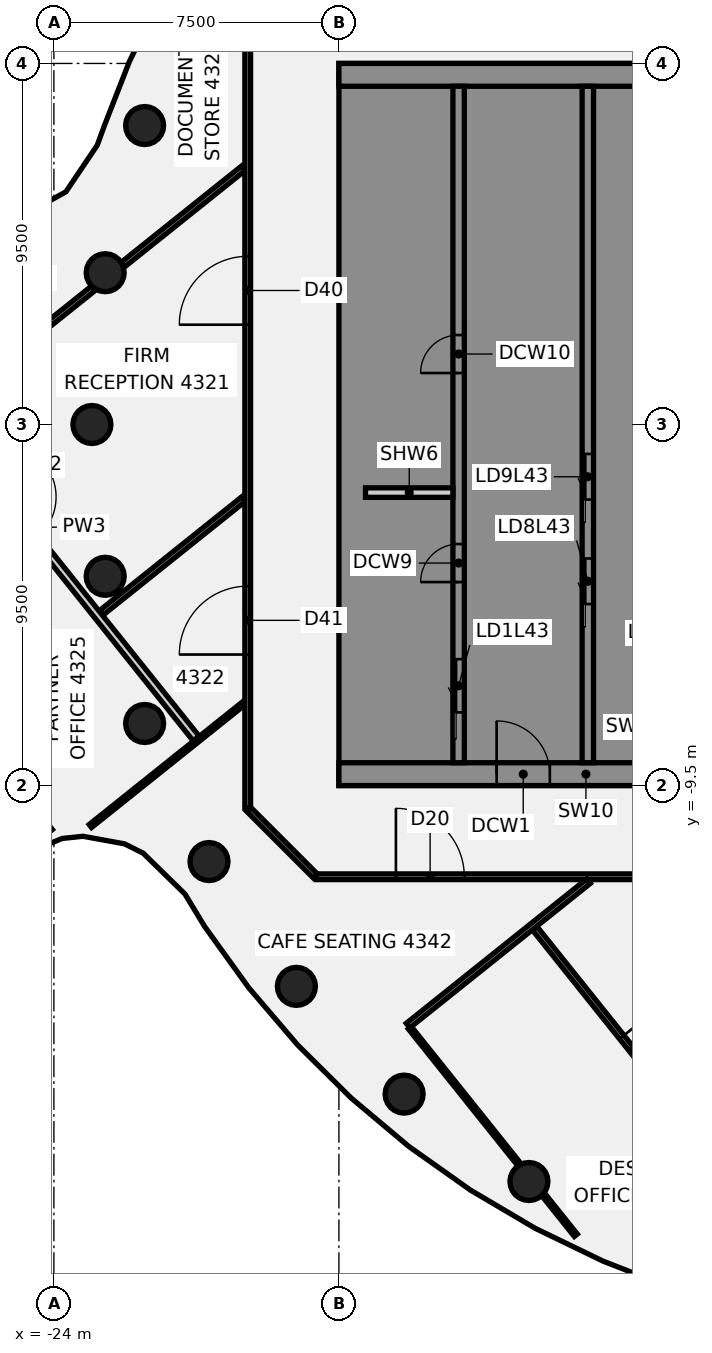
"""IFC4 building model, lengths in metres.
Left out: names, types, materials, properties, quantities, classifications, styles, units other than length and angle.
Written with IfcOpenShell. Run it as: python <this file> out.ifc"""

import sys

from ifc_helpers import new_model, si_unit, direction, frame, frame_2d, origin, origin_2d, place, context, subcontext, project, spatial, polyline, rectangle, circle, outline, extrude, element, fill, save


model = new_model("IFC4")
c1 = context("Model", 3, precision=1e-05, world=origin(), true_north=direction((0.0, 1.0)))
c2 = subcontext(c1, "Body", "Model", "MODEL_VIEW")
j1 = project(units=[si_unit("LENGTHUNIT", "METRE"), si_unit("PLANEANGLEUNIT", "RADIAN")], contexts=[c1])
p1 = place(None, origin())
s1 = spatial("IfcSite", under=j1, at=p1, CompositionType="ELEMENT")
p2 = place(p1, origin())
s2 = spatial("IfcBuilding", under=s1, at=p2, CompositionType="ELEMENT")
p3 = place(p2, frame((0.0, 0.0, 174.25)))
s3 = spatial("IfcBuildingStorey", under=s2, at=p3, CompositionType="ELEMENT", Elevation=174.25)
for number, where, z_axis, x_axis in (
    (1, (-21.613, 7.866, -0.14), (0.0, 0.0, 1.0), (1.0, 0.0, 0.0)),
    (2, (-22.651, 3.994, -0.14), (0.0, 0.0, 1.0), (1.0, 0.0, 0.0)),
    (3, (-23.0, 0.0, -0.14), (0.0, 0.0, 1.0), (1.0, 0.0, 0.0)),
    (4, (-22.651, -3.994, -0.14), (0.0, 0.0, 1.0), (1.0, 0.0, 0.0)),
    (5, (-21.613, -7.866, -0.14), (0.0, 0.0, 1.0), (1.0, 0.0, 0.0)),
    (6, (-19.919, -11.5, -0.14), (0.0, 0.0, 1.0), (1.0, 0.0, 0.0)),
    (7, (-17.619, -14.784, -0.14), (0.0, 0.0, 1.0), (1.0, 0.0, 0.0)),
    (8, (-14.784, -17.619, -0.14), (0.0, 0.0, 1.0), (1.0, 0.0, 0.0)),
    (9, (-11.5, -19.919, -0.14), (0.0, 0.0, 1.0), (1.0, 0.0, 0.0)),
):
    element("IfcColumn", number, at=place(p3, frame(where, z_axis=z_axis, x_axis=x_axis)), inside=s3, PredefinedType="COLUMN", context=c2, shape_type="SweptSolid", body=[
        extrude(circle(Radius=0.5, at=origin_2d()), origin(), (0.0, 0.0, 1.0), 3.71),
    ])
p4 = place(p3, frame((-29.152, 2.857, 0.0), z_axis=(0.0, 0.0, 1.0), x_axis=(0.624692956649, -0.780870482163, 0.0)))
e10 = element("IfcWall", 10, at=p4, inside=s3, PredefinedType="PARTITIONING", context=c2, shape_type="SweptSolid", body=[
    extrude(rectangle(XDim=14.24, YDim=0.2, at=frame_2d((7.12, 0.0))), origin(), (0.0, 0.0, 1.0), 2.87),
])
p5 = place(p4, frame((6.099, 0.0, 0.0)))
e11 = element("IfcOpeningElement", 11, at=p5, cuts=e10, PredefinedType="OPENING", context=c2, shape_type="SweptSolid", body=[
    extrude(rectangle(XDim=1.4, YDim=2.1, at=frame_2d((0.7, 1.05))), frame((0.0, 0.11, 0.0), z_axis=(0.0, -1.0, 0.0), x_axis=(1.0, 0.0, 0.0)), (0.0, 0.0, 1.0), 0.22),
])
p6 = place(p3, frame((-24.625, -10.006, 0.0), z_axis=(0.0, 0.0, 1.0), x_axis=(0.624661023659, -0.780896027344, 0.0)))
e12 = element("IfcWall", 12, at=p6, inside=s3, PredefinedType="PARTITIONING", context=c2, shape_type="SweptSolid", body=[
    extrude(rectangle(XDim=0.875, YDim=0.1, at=frame_2d((0.438, 0.0))), origin(), (0.0, 0.0, 1.0), 2.97),
])
p7 = place(p3, frame((-14.633, -15.874, 0.0), z_axis=(0.0, 0.0, 1.0), x_axis=(0.624636960835, -0.780915275276, 0.0)))
e13 = element("IfcWall", 13, at=p7, inside=s3, PredefinedType="PARTITIONING", context=c2, shape_type="SweptSolid", body=[
    extrude(rectangle(XDim=4.613, YDim=0.1, at=frame_2d((2.307, 0.0))), origin(), (0.0, 0.0, 1.0), 2.97),
])
p8 = place(p3, frame((-11.134, -20.249, 0.0), z_axis=(0.0, 0.0, 1.0), x_axis=(0.62463072699, -0.780920261551, 0.0)))
e14 = element("IfcWall", 14, at=p8, inside=s3, PredefinedType="PARTITIONING", context=c2, shape_type="SweptSolid", body=[
    extrude(rectangle(XDim=1.389, YDim=0.1, at=frame_2d((0.694, 0.0))), origin(), (0.0, 0.0, 1.0), 2.97),
])
p9 = place(p3, frame((-11.35, -13.253, 0.0), z_axis=(0.0, 0.0, 1.0), x_axis=(0.624656044028, -0.780900010667, 0.0)))
e15 = element("IfcWall", 15, at=p9, inside=s3, PredefinedType="PARTITIONING", context=c2, shape_type="SweptSolid", body=[
    extrude(rectangle(XDim=11.45, YDim=0.15, at=frame_2d((5.725, 0.0))), origin(), (0.0, 0.0, 1.0), 2.97),
])
p10 = place(p9, frame((3.67, 0.0, 0.0)))
e16 = element("IfcOpeningElement", 16, at=p10, cuts=e15, PredefinedType="OPENING", context=c2, shape_type="SweptSolid", body=[
    extrude(rectangle(XDim=0.9, YDim=2.1, at=frame_2d((0.45, 1.05))), frame((0.0, 0.085, 0.0), z_axis=(0.0, -1.0, 0.0), x_axis=(1.0, 0.0, 0.0)), (0.0, 0.0, 1.0), 0.17),
])
p11 = place(p3, frame((-18.872, -10.128, 0.0), z_axis=(0.0, 0.0, 1.0), x_axis=(0.707106781187, -0.707106781187, 0.0)))
e17 = element("IfcWall", 17, at=p11, inside=s3, PredefinedType="PARTITIONING", context=c2, shape_type="SweptSolid", body=[
    extrude(rectangle(XDim=2.465, YDim=0.15, at=frame_2d((1.232, 0.0))), origin(), (0.0, 0.0, 1.0), 2.97),
])
p12 = place(p3, frame((-17.1, -11.9, 0.0), z_axis=(0.0, 0.0, 1.0), x_axis=(1.0, 0.0, 0.0)))
e18 = element("IfcWall", 18, at=p12, inside=s3, PredefinedType="PARTITIONING", context=c2, shape_type="SweptSolid", body=[
    extrude(rectangle(XDim=34.165, YDim=0.15, at=frame_2d((17.083, 0.0))), origin(), (0.0, 0.0, 1.0), 2.97),
])
p13 = place(p12, frame((9.414, 0.0, 0.0)))
e19 = element("IfcOpeningElement", 19, at=p13, cuts=e18, PredefinedType="OPENING", context=c2, shape_type="SweptSolid", body=[
    extrude(rectangle(XDim=1.8, YDim=2.1, at=frame_2d((0.9, 1.05))), frame((0.0, 0.085, 0.0), z_axis=(0.0, -1.0, 0.0), x_axis=(1.0, 0.0, 0.0)), (0.0, 0.0, 1.0), 0.17),
])
p14 = place(p12, frame((2.1, 0.0, 0.0)))
e20 = element("IfcOpeningElement", 20, at=p14, cuts=e18, PredefinedType="OPENING", context=c2, shape_type="SweptSolid", body=[
    extrude(rectangle(XDim=1.8, YDim=2.1, at=frame_2d((0.9, 1.05))), frame((0.0, 0.085, 0.0), z_axis=(0.0, -1.0, 0.0), x_axis=(1.0, 0.0, 0.0)), (0.0, 0.0, 1.0), 0.17),
])
p15 = place(p12, frame((23.853, 0.0, 0.0)))
e21 = element("IfcOpeningElement", 21, at=p15, cuts=e18, PredefinedType="OPENING", context=c2, shape_type="SweptSolid", body=[
    extrude(rectangle(XDim=1.8, YDim=2.1, at=frame_2d((0.9, 1.05))), frame((0.0, 0.085, 0.0), z_axis=(0.0, -1.0, 0.0), x_axis=(1.0, 0.0, 0.0)), (0.0, 0.0, 1.0), 0.17),
])
p16 = place(p3, frame((-27.013, 0.344, 0.0), z_axis=(0.0, 0.0, 1.0), x_axis=(0.780855081302, 0.624712207344, 0.0)))
e22 = element("IfcWall", 22, at=p16, inside=s3, PredefinedType="PARTITIONING", context=c2, shape_type="SweptSolid", body=[
    extrude(rectangle(XDim=5.205, YDim=0.15, at=frame_2d((2.603, 0.0))), origin(), (0.0, 0.0, 1.0), 2.97),
])
p17 = place(p16, frame((2.75, 0.0, 0.0)))
e23 = element("IfcOpeningElement", 23, at=p17, cuts=e22, PredefinedType="OPENING", context=c2, shape_type="SweptSolid", body=[
    extrude(rectangle(XDim=0.9, YDim=2.1, at=frame_2d((0.45, 1.05))), frame((0.0, 0.085, 0.0), z_axis=(0.0, -1.0, 0.0), x_axis=(1.0, 0.0, 0.0)), (0.0, 0.0, 1.0), 0.17),
])
p18 = place(p3, frame((-22.195, 4.198, 0.0), z_axis=(0.0, 0.0, 1.0), x_axis=(0.780862978875, 0.624702335694, 0.0)))
e24 = element("IfcWall", 24, at=p18, inside=s3, PredefinedType="PARTITIONING", context=c2, shape_type="SweptSolid", body=[
    extrude(rectangle(XDim=4.085, YDim=0.15, at=frame_2d((2.042, 0.0))), origin(), (0.0, 0.0, 1.0), 2.97),
])
p19 = place(p3, frame((-23.041, -10.565, 0.0), z_axis=(0.0, 0.0, 1.0), x_axis=(0.780900948361, 0.624654871789, 0.0)))
e25 = element("IfcWall", 25, at=p19, inside=s3, PredefinedType="PARTITIONING", context=c2, shape_type="SweptSolid", body=[
    extrude(rectangle(XDim=5.188, YDim=0.1, at=frame_2d((2.594, 0.0))), origin(), (0.0, 0.0, 1.0), 2.97),
])
p20 = place(p3, frame((-22.75, -4.954, 0.0), z_axis=(0.0, 0.0, 1.0), x_axis=(0.780873776027, 0.624688839274, 0.0)))
e26 = element("IfcWall", 26, at=p20, inside=s3, PredefinedType="PARTITIONING", context=c2, shape_type="SweptSolid", body=[
    extrude(rectangle(XDim=4.796, YDim=0.15, at=frame_2d((2.398, 0.0))), origin(), (0.0, 0.0, 1.0), 2.87),
])
p21 = place(p3, frame((-14.68, -15.815, 0.0), z_axis=(0.0, 0.0, 1.0), x_axis=(0.780857060807, 0.624709733066, 0.0)))
e27 = element("IfcWall", 27, at=p21, inside=s3, PredefinedType="PARTITIONING", context=c2, shape_type="SweptSolid", body=[
    extrude(rectangle(XDim=6.082, YDim=0.15, at=frame_2d((3.041, 0.0))), origin(), (0.0, 0.0, 1.0), 2.97),
])
p22 = place(p3, frame((-18.9, -10.1, 0.0), z_axis=(0.0, 0.0, 1.0), x_axis=(0.0, 1.0, 0.0)))
e28 = element("IfcWall", 28, at=p22, inside=s3, PredefinedType="PARTITIONING", context=c2, shape_type="SweptSolid", body=[
    extrude(rectangle(XDim=20.2, YDim=0.15, at=frame_2d((10.1, 0.0))), origin(), (0.0, 0.0, 1.0), 2.97),
])
p23 = place(p22, frame((12.726, 0.0, 0.0)))
e29 = element("IfcOpeningElement", 29, at=p23, cuts=e28, PredefinedType="OPENING", context=c2, shape_type="SweptSolid", body=[
    extrude(rectangle(XDim=1.8, YDim=2.1, at=frame_2d((0.9, 1.05))), frame((0.0, 0.085, 0.0), z_axis=(0.0, -1.0, 0.0), x_axis=(1.0, 0.0, 0.0)), (0.0, 0.0, 1.0), 0.17),
])
p24 = place(p22, frame((4.047, 0.0, 0.0)))
e30 = element("IfcOpeningElement", 30, at=p24, cuts=e28, PredefinedType="OPENING", context=c2, shape_type="SweptSolid", body=[
    extrude(rectangle(XDim=1.8, YDim=2.1, at=frame_2d((0.9, 1.05))), frame((0.0, 0.085, 0.0), z_axis=(0.0, -1.0, 0.0), x_axis=(1.0, 0.0, 0.0)), (0.0, 0.0, 1.0), 0.17),
])
p25 = place(p3, frame((-16.5, -9.2, 0.0), z_axis=(0.0, 0.0, 1.0), x_axis=(1.0, 0.0, 0.0)))
e31 = element("IfcWall", 31, at=p25, inside=s3, PredefinedType="SHEAR", context=c2, shape_type="SweptSolid", body=[
    extrude(rectangle(XDim=13.0, YDim=0.6, at=frame_2d((6.5, 0.0))), origin(), (0.0, 0.0, 1.0), 3.57),
])
p26 = place(p25, frame((4.15, 0.0, 0.0)))
e32 = element("IfcOpeningElement", 32, at=p26, cuts=e31, PredefinedType="OPENING", context=c2, shape_type="SweptSolid", body=[
    extrude(rectangle(XDim=1.4, YDim=2.1, at=frame_2d((0.7, 1.05))), frame((0.0, 0.31, 0.0), z_axis=(0.0, -1.0, 0.0), x_axis=(1.0, 0.0, 0.0)), (0.0, 0.0, 1.0), 0.62),
])
p27 = place(p25, frame((10.125, 0.0, 0.0)))
e33 = element("IfcOpeningElement", 33, at=p27, cuts=e31, PredefinedType="OPENING", context=c2, shape_type="SweptSolid", body=[
    extrude(rectangle(XDim=1.4, YDim=2.1, at=frame_2d((0.7, 1.05))), frame((0.0, 0.31, 0.0), z_axis=(0.0, -1.0, 0.0), x_axis=(1.0, 0.0, 0.0)), (0.0, 0.0, 1.0), 0.62),
])
p28 = place(p3, origin())
e34 = element("IfcWall", 34, at=p28, inside=s3, PredefinedType="SHEAR", context=c2, shape_type="SweptSolid", body=[
    extrude(outline(polyline([(-13.5, -8.125), (-15.9, -8.125), (-15.9, -5.625), (-13.5, -5.625), (-13.5, -5.375), (-15.9, -5.375), (-15.9, 5.375), (-13.5, 5.375), (-13.5, 5.625), (-15.9, 5.625), (-15.9, 8.125), (-13.5, 8.125), (-13.5, 8.9), (-15.9, 8.9), (-16.5, 8.9), (-16.5, -8.9), (-15.9, -8.9), (-13.5, -8.9), (-13.5, -8.125)])), origin(), (0.0, 0.0, 1.0), 3.57),
])
p29 = place(p3, frame((-16.5, 9.2, 0.0), z_axis=(0.0, 0.0, 1.0), x_axis=(1.0, 0.0, 0.0)))
e35 = element("IfcWall", 35, at=p29, inside=s3, PredefinedType="SHEAR", context=c2, shape_type="SweptSolid", body=[
    extrude(rectangle(XDim=13.0, YDim=0.6, at=frame_2d((6.5, 0.0))), origin(), (0.0, 0.0, 1.0), 3.57),
])
p30 = place(p3, origin())
e36 = element("IfcWall", 36, at=p30, inside=s3, PredefinedType="SHEAR", context=c2, shape_type="SweptSolid", body=[
    extrude(outline(polyline([(-9.8, -5.375), (-9.8, -5.625), (-7.5, -5.625), (-7.2, -5.625), (-7.2, 8.9), (-7.5, 8.9), (-9.8, 8.9), (-9.8, 8.125), (-7.5, 8.125), (-7.5, 5.625), (-9.8, 5.625), (-9.8, 5.375), (-7.5, 5.375), (-7.5, 2.875), (-9.8, 2.875), (-9.8, 2.625), (-7.5, 2.625), (-7.5, 0.125), (-9.8, 0.125), (-9.8, -0.125), (-7.5, -0.125), (-7.5, -2.625), (-9.8, -2.625), (-9.8, -2.875), (-7.5, -2.875), (-7.5, -5.375), (-9.8, -5.375)])), origin(), (0.0, 0.0, 1.0), 3.57),
])
p31 = place(p3, origin())
e37 = element("IfcWall", 37, at=p31, inside=s3, PredefinedType="SHEAR", context=c2, shape_type="SweptSolid", body=[
    extrude(outline(polyline([(-7.5, -8.125), (-9.55, -8.125), (-9.55, -5.625), (-9.8, -5.625), (-9.8, -8.125), (-9.8, -8.9), (-7.5, -8.9), (-7.5, -8.125)])), origin(), (0.0, 0.0, 1.0), 3.57),
])
p32 = place(p3, frame((-13.35, -8.9, 0.0), z_axis=(0.0, 0.0, 1.0), x_axis=(0.0, 1.0, 0.0)))
e38 = element("IfcWall", 38, at=p32, inside=s3, PredefinedType="SHEAR", context=c2, shape_type="SweptSolid", body=[
    extrude(rectangle(XDim=17.8, YDim=0.3, at=frame_2d((8.9, 0.0))), origin(), (0.0, 0.0, 1.0), 3.57),
])
p33 = place(p32, frame((1.325, 0.0, 0.0)))
e39 = element("IfcOpeningElement", 39, at=p33, cuts=e38, PredefinedType="OPENING", context=c2, shape_type="SweptSolid", body=[
    extrude(rectangle(XDim=1.4, YDim=2.1, at=frame_2d((0.7, 1.05))), frame((0.0, 0.16, 0.0), z_axis=(0.0, -1.0, 0.0), x_axis=(1.0, 0.0, 0.0)), (0.0, 0.0, 1.0), 0.32),
])
p34 = place(p32, frame((4.754, 0.0, 0.0)))
e40 = element("IfcOpeningElement", 40, at=p34, cuts=e38, PredefinedType="OPENING", context=c2, shape_type="SweptSolid", body=[
    extrude(rectangle(XDim=1.0, YDim=2.1, at=frame_2d((0.5, 1.05))), frame((0.0, 0.16, 0.0), z_axis=(0.0, -1.0, 0.0), x_axis=(1.0, 0.0, 0.0)), (0.0, 0.0, 1.0), 0.32),
])
p35 = place(p32, frame((10.254, 0.0, 0.0)))
e41 = element("IfcOpeningElement", 41, at=p35, cuts=e38, PredefinedType="OPENING", context=c2, shape_type="SweptSolid", body=[
    extrude(rectangle(XDim=1.0, YDim=2.1, at=frame_2d((0.5, 1.05))), frame((0.0, 0.16, 0.0), z_axis=(0.0, -1.0, 0.0), x_axis=(1.0, 0.0, 0.0)), (0.0, 0.0, 1.0), 0.32),
])
p36 = place(p3, frame((-9.95, -8.9, 0.0), z_axis=(0.0, 0.0, 1.0), x_axis=(0.0, 1.0, 0.0)))
e42 = element("IfcWall", 42, at=p36, inside=s3, PredefinedType="SHEAR", context=c2, shape_type="SweptSolid", body=[
    extrude(rectangle(XDim=17.8, YDim=0.3, at=frame_2d((8.9, 0.0))), origin(), (0.0, 0.0, 1.0), 3.57),
])
p37 = place(p36, frame((4.175, 0.0, 0.0)))
e43 = element("IfcOpeningElement", 43, at=p37, cuts=e42, PredefinedType="OPENING", context=c2, shape_type="SweptSolid", body=[
    extrude(rectangle(XDim=1.2, YDim=2.1, at=frame_2d((0.6, 1.05))), frame((0.0, 0.16, 0.0), z_axis=(0.0, -1.0, 0.0), x_axis=(1.0, 0.0, 0.0)), (0.0, 0.0, 1.0), 0.32),
])
p38 = place(p36, frame((6.925, 0.0, 0.0)))
e44 = element("IfcOpeningElement", 44, at=p38, cuts=e42, PredefinedType="OPENING", context=c2, shape_type="SweptSolid", body=[
    extrude(rectangle(XDim=1.2, YDim=2.1, at=frame_2d((0.6, 1.05))), frame((0.0, 0.16, 0.0), z_axis=(0.0, -1.0, 0.0), x_axis=(1.0, 0.0, 0.0)), (0.0, 0.0, 1.0), 0.32),
])
p39 = place(p3, frame((-15.8, -1.792, 0.0), z_axis=(0.0, 0.0, 1.0), x_axis=(1.0, 0.0, 0.0)))
e45 = element("IfcWall", 45, at=p39, inside=s3, PredefinedType="PARTITIONING", context=c2, shape_type="SweptSolid", body=[
    extrude(rectangle(XDim=2.3, YDim=0.25, at=frame_2d((1.15, 0.0))), origin(), (0.0, 0.0, 1.0), 3.57),
])
p40 = place(p10, frame((0.9, 0.0, 0.0), z_axis=(0.0, 0.0, 1.0), x_axis=(-1.0, 0.0, 0.0)))
e46 = element("IfcDoor", 46, at=p40, inside=s3, OperationType="SINGLE_SWING_LEFT", PredefinedType="DOOR", context=c2, shape_type="SweptSolid", body=[
    extrude(rectangle(XDim=0.9, YDim=2.1, at=frame_2d((0.45, 1.05))), frame((0.0, 0.025, 0.0), z_axis=(0.0, -1.0, 0.0), x_axis=(1.0, 0.0, 0.0)), (0.0, 0.0, 1.0), 0.05),
])
fill(e16, e46)
p41 = place(p14, frame((1.8, 0.0, 0.0), z_axis=(0.0, 0.0, 1.0), x_axis=(-1.0, 0.0, 0.0)))
e47 = element("IfcDoor", 47, at=p41, inside=s3, OperationType="DOUBLE_DOOR_SINGLE_SWING", PredefinedType="DOOR", context=c2, shape_type="SweptSolid", body=[
    extrude(rectangle(XDim=1.8, YDim=2.1, at=frame_2d((0.9, 1.05))), frame((0.0, 0.025, 0.0), z_axis=(0.0, -1.0, 0.0), x_axis=(1.0, 0.0, 0.0)), (0.0, 0.0, 1.0), 0.05),
])
fill(e20, e47)
p42 = place(p23, frame((1.8, 0.0, 0.0), z_axis=(0.0, 0.0, 1.0), x_axis=(-1.0, 0.0, 0.0)))
e48 = element("IfcDoor", 48, at=p42, inside=s3, OperationType="DOUBLE_DOOR_SINGLE_SWING", PredefinedType="DOOR", context=c2, shape_type="SweptSolid", body=[
    extrude(rectangle(XDim=1.8, YDim=2.1, at=frame_2d((0.9, 1.05))), frame((0.0, 0.025, 0.0), z_axis=(0.0, -1.0, 0.0), x_axis=(1.0, 0.0, 0.0)), (0.0, 0.0, 1.0), 0.05),
])
fill(e29, e48)
p43 = place(p24, origin())
e49 = element("IfcDoor", 49, at=p43, inside=s3, OperationType="DOUBLE_DOOR_SINGLE_SWING", PredefinedType="DOOR", context=c2, shape_type="SweptSolid", body=[
    extrude(rectangle(XDim=1.8, YDim=2.1, at=frame_2d((0.9, 1.05))), frame((0.0, 0.025, 0.0), z_axis=(0.0, -1.0, 0.0), x_axis=(1.0, 0.0, 0.0)), (0.0, 0.0, 1.0), 0.05),
])
fill(e30, e49)
p44 = place(p26, origin())
e50 = element("IfcDoor", 50, at=p44, inside=s3, OperationType="SINGLE_SWING_LEFT", PredefinedType="DOOR", context=c2, shape_type="SweptSolid", body=[
    extrude(rectangle(XDim=1.4, YDim=2.1, at=frame_2d((0.7, 1.05))), frame((0.0, 0.025, 0.0), z_axis=(0.0, -1.0, 0.0), x_axis=(1.0, 0.0, 0.0)), (0.0, 0.0, 1.0), 0.05),
])
fill(e32, e50)
p45 = place(p33, origin())
e51 = element("IfcDoor", 51, at=p45, inside=s3, OperationType="SLIDING_TO_LEFT", PredefinedType="DOOR", context=c2, shape_type="SweptSolid", body=[
    extrude(rectangle(XDim=1.4, YDim=2.1, at=frame_2d((0.7, 1.05))), frame((0.0, 0.025, 0.0), z_axis=(0.0, -1.0, 0.0), x_axis=(1.0, 0.0, 0.0)), (0.0, 0.0, 1.0), 0.05),
])
fill(e39, e51)
p46 = place(p37, origin())
e52 = element("IfcDoor", 52, at=p46, inside=s3, OperationType="SLIDING_TO_LEFT", PredefinedType="DOOR", context=c2, shape_type="SweptSolid", body=[
    extrude(rectangle(XDim=1.2, YDim=2.1, at=frame_2d((0.6, 1.05))), frame((0.0, 0.025, 0.0), z_axis=(0.0, -1.0, 0.0), x_axis=(1.0, 0.0, 0.0)), (0.0, 0.0, 1.0), 0.05),
])
fill(e43, e52)
p47 = place(p38, origin())
e53 = element("IfcDoor", 53, at=p47, inside=s3, OperationType="SLIDING_TO_LEFT", PredefinedType="DOOR", context=c2, shape_type="SweptSolid", body=[
    extrude(rectangle(XDim=1.2, YDim=2.1, at=frame_2d((0.6, 1.05))), frame((0.0, 0.025, 0.0), z_axis=(0.0, -1.0, 0.0), x_axis=(1.0, 0.0, 0.0)), (0.0, 0.0, 1.0), 0.05),
])
fill(e44, e53)
p48 = place(p34, origin())
e54 = element("IfcDoor", 54, at=p48, inside=s3, OperationType="SINGLE_SWING_LEFT", PredefinedType="DOOR", context=c2, shape_type="SweptSolid", body=[
    extrude(rectangle(XDim=1.0, YDim=2.1, at=frame_2d((0.5, 1.05))), frame((0.0, 0.025, 0.0), z_axis=(0.0, -1.0, 0.0), x_axis=(1.0, 0.0, 0.0)), (0.0, 0.0, 1.0), 0.05),
])
fill(e40, e54)
p49 = place(p35, origin())
e55 = element("IfcDoor", 55, at=p49, inside=s3, OperationType="SINGLE_SWING_LEFT", PredefinedType="DOOR", context=c2, shape_type="SweptSolid", body=[
    extrude(rectangle(XDim=1.0, YDim=2.1, at=frame_2d((0.5, 1.05))), frame((0.0, 0.025, 0.0), z_axis=(0.0, -1.0, 0.0), x_axis=(1.0, 0.0, 0.0)), (0.0, 0.0, 1.0), 0.05),
])
fill(e41, e55)
save(model, sys.argv[1])
